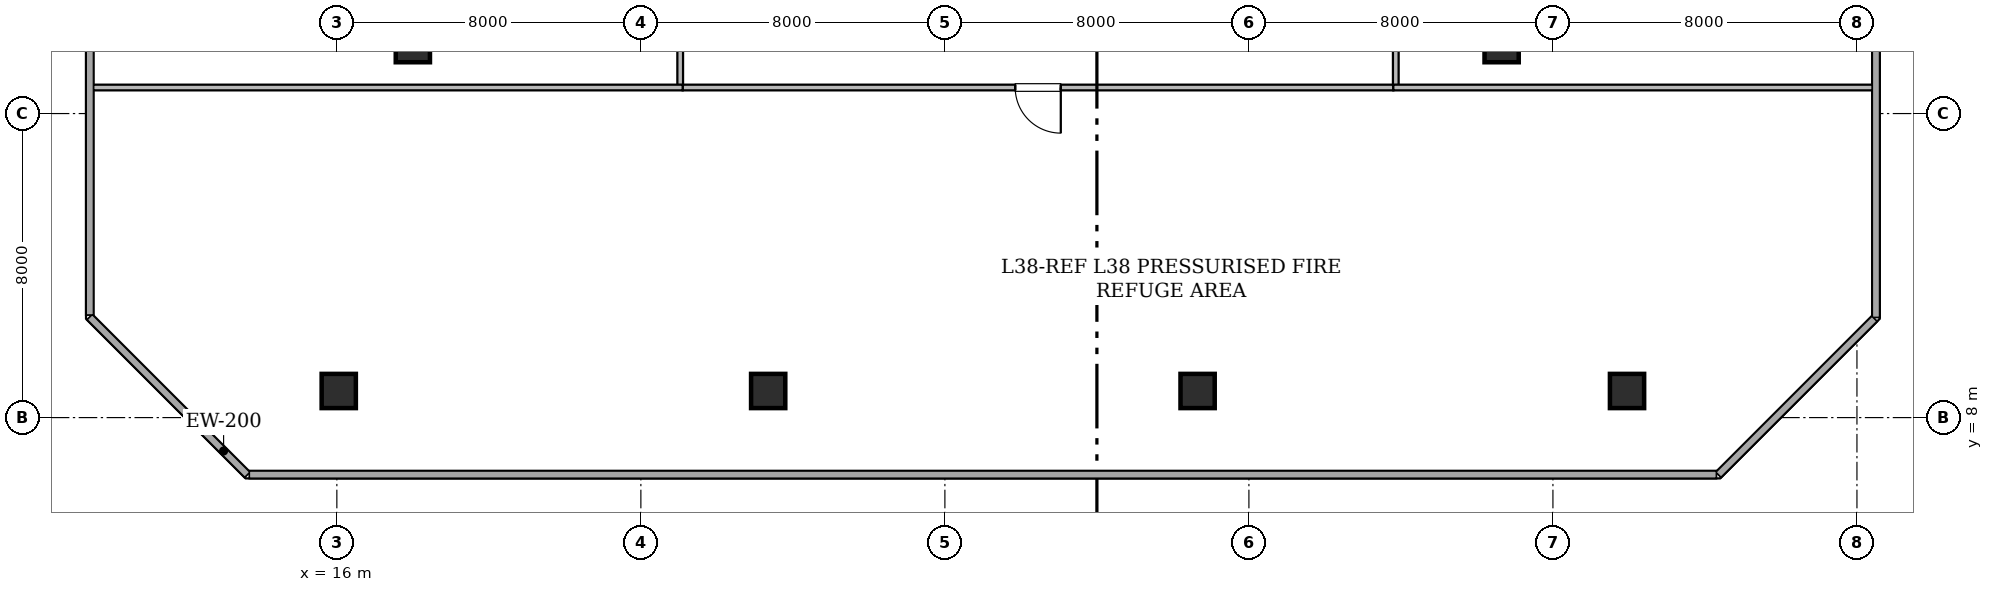
"""IFC4 building model, lengths in metres.
Left out: names, types, materials, properties, quantities, classifications, styles, units other than length and angle.
Written with IfcOpenShell. Run it as: python <this file> out.ifc"""

import sys

from ifc_helpers import new_model, si_unit, direction, frame, frame_2d, origin, origin_2d, place, context, subcontext, project, spatial, rectangle, hollow_rectangle, extrude, element, fill, save


model = new_model("IFC4")
c1 = context("Model", 3, precision=1e-05, world=origin(), true_north=direction((0.0, 1.0)))
c2 = subcontext(c1, "Body", "Model", "MODEL_VIEW")
j1 = project(units=[si_unit("LENGTHUNIT", "METRE"), si_unit("PLANEANGLEUNIT", "RADIAN")], contexts=[c1])
p1 = place(None, origin())
s1 = spatial("IfcSite", under=j1, at=p1, CompositionType="ELEMENT")
p2 = place(p1, origin())
s2 = spatial("IfcBuilding", under=s1, at=p2, CompositionType="ELEMENT")
p3 = place(p2, frame((0.0, 0.0, 150.5)))
s3 = spatial("IfcBuildingStorey", under=s2, at=p3, CompositionType="ELEMENT", Elevation=150.5)
for number, where, z_axis, x_axis in (
    (1, (16.05, 8.7, 0.0), (0.0, 0.0, 1.0), (1.0, 0.0, 0.0)),
    (2, (27.35, 8.7, 0.0), (0.0, 0.0, 1.0), (1.0, 0.0, 0.0)),
    (3, (38.65, 8.7, 0.0), (0.0, 0.0, 1.0), (1.0, 0.0, 0.0)),
    (4, (49.95, 8.7, 0.0), (0.0, 0.0, 1.0), (1.0, 0.0, 0.0)),
    (5, (18.0, 17.8, 0.0), (0.0, 0.0, 1.0), (1.0, 0.0, 0.0)),
    (6, (46.65, 17.8, 0.0), (0.0, 0.0, 1.0), (1.0, 0.0, 0.0)),
):
    element("IfcColumn", number, at=place(p3, frame(where, z_axis=z_axis, x_axis=x_axis)), inside=s3, PredefinedType="COLUMN", context=c2, shape_type="SweptSolid", body=[
        extrude(hollow_rectangle(XDim=0.9, YDim=0.9, WallThickness=0.045, at=origin_2d()), origin(), (0.0, 0.0, 1.0), 5.375),
    ])
p4 = place(p3, frame((13.641, 6.5, 0.0), z_axis=(0.0, 0.0, 1.0), x_axis=(-0.707106781187, 0.707106781187, 0.0)))
e7 = element("IfcWall", 7, at=p4, inside=s3, PredefinedType="STANDARD", context=c2, shape_type="SweptSolid", body=[
    extrude(rectangle(XDim=5.856, YDim=0.2, at=frame_2d((2.928, 0.0))), origin(), (0.0, 0.0, 1.0), 1.15),
])
p5 = place(p3, frame((9.5, 10.704, 0.0), z_axis=(0.0, 0.0, 1.0), x_axis=(0.0, 1.0, 0.0)))
e8 = element("IfcWall", 8, at=p5, inside=s3, PredefinedType="STANDARD", context=c2, shape_type="SweptSolid", body=[
    extrude(rectangle(XDim=14.063, YDim=0.2, at=frame_2d((7.031, 0.0))), origin(), (0.0, 0.0, 1.0), 1.15),
])
p6 = place(p3, frame((56.5, 24.717, 0.0), z_axis=(0.0, 0.0, 1.0), x_axis=(0.0, -1.0, 0.0)))
e9 = element("IfcWall", 9, at=p6, inside=s3, PredefinedType="STANDARD", context=c2, shape_type="SweptSolid", body=[
    extrude(rectangle(XDim=14.076, YDim=0.2, at=frame_2d((7.038, 0.0))), origin(), (0.0, 0.0, 1.0), 1.15),
])
p7 = place(p3, frame((56.457, 10.598, 0.0), z_axis=(0.0, 0.0, 1.0), x_axis=(-0.707127843897, -0.707085717849, 0.0)))
e10 = element("IfcWall", 10, at=p7, inside=s3, PredefinedType="STANDARD", context=c2, shape_type="SweptSolid", body=[
    extrude(rectangle(XDim=5.795, YDim=0.2, at=frame_2d((2.898, 0.0))), origin(), (0.0, 0.0, 1.0), 1.15),
])
p8 = place(p3, frame((52.296, 6.5, 0.0), z_axis=(0.0, 0.0, 1.0), x_axis=(-1.0, 0.0, 0.0)))
e11 = element("IfcWall", 11, at=p8, inside=s3, PredefinedType="STANDARD", context=c2, shape_type="SweptSolid", body=[
    extrude(rectangle(XDim=38.593, YDim=0.2, at=frame_2d((19.296, 0.0))), origin(), (0.0, 0.0, 1.0), 1.15),
])
p9 = place(p3, frame((43.8, 16.685, 0.0), z_axis=(0.0, 0.0, 1.0), x_axis=(-1.0, 0.0, 0.0)))
e12 = element("IfcWall", 12, at=p9, inside=s3, PredefinedType="STANDARD", context=c2, shape_type="SweptSolid", body=[
    extrude(rectangle(XDim=18.7, YDim=0.15, at=frame_2d((9.35, 0.0))), origin(), (0.0, 0.0, 1.0), 3.42),
])
p10 = place(p9, frame((8.75, 0.0, 0.0)))
e13 = element("IfcOpeningElement", 13, at=p10, cuts=e12, PredefinedType="OPENING", context=c2, shape_type="SweptSolid", body=[
    extrude(rectangle(XDim=1.2, YDim=2.15, at=frame_2d((0.6, 1.075))), frame((0.0, 0.085, 0.0), z_axis=(0.0, -1.0, 0.0), x_axis=(1.0, 0.0, 0.0)), (0.0, 0.0, 1.0), 0.17),
])
p11 = place(p3, frame((25.035, 16.75, 0.0), z_axis=(0.0, 0.0, 1.0), x_axis=(0.0, 1.0, 0.0)))
e14 = element("IfcWall", 14, at=p11, inside=s3, PredefinedType="STANDARD", context=c2, shape_type="SweptSolid", body=[
    extrude(rectangle(XDim=12.564, YDim=0.15, at=frame_2d((6.282, 0.0))), origin(), (0.0, 0.0, 1.0), 3.42),
])
p12 = place(p11, frame((5.661, 0.0, 0.0)))
e15 = element("IfcOpeningElement", 15, at=p12, cuts=e14, PredefinedType="OPENING", context=c2, shape_type="SweptSolid", body=[
    extrude(rectangle(XDim=1.2, YDim=2.15, at=frame_2d((0.6, 1.075))), frame((0.0, 0.085, 0.0), z_axis=(0.0, -1.0, 0.0), x_axis=(1.0, 0.0, 0.0)), (0.0, 0.0, 1.0), 0.17),
])
p13 = place(p3, frame((43.865, 29.314, 0.0), z_axis=(0.0, 0.0, 1.0), x_axis=(0.0, -1.0, 0.0)))
e16 = element("IfcWall", 16, at=p13, inside=s3, PredefinedType="STANDARD", context=c2, shape_type="SweptSolid", body=[
    extrude(rectangle(XDim=12.564, YDim=0.15, at=frame_2d((6.282, 0.0))), origin(), (0.0, 0.0, 1.0), 3.42),
])
p14 = place(p13, frame((5.703, 0.0, 0.0)))
e17 = element("IfcOpeningElement", 17, at=p14, cuts=e16, PredefinedType="OPENING", context=c2, shape_type="SweptSolid", body=[
    extrude(rectangle(XDim=1.2, YDim=2.15, at=frame_2d((0.6, 1.075))), frame((0.0, 0.085, 0.0), z_axis=(0.0, -1.0, 0.0), x_axis=(1.0, 0.0, 0.0)), (0.0, 0.0, 1.0), 0.17),
])
p15 = place(p3, frame((9.592, 16.685, 0.0), z_axis=(0.0, 0.0, 1.0), x_axis=(1.0, 0.0, 0.0)))
e18 = element("IfcWall", 18, at=p15, inside=s3, PredefinedType="STANDARD", context=c2, shape_type="SweptSolid", body=[
    extrude(rectangle(XDim=15.508, YDim=0.15, at=frame_2d((7.754, 0.0))), origin(), (0.0, 0.0, 1.0), 3.42),
])
p16 = place(p3, frame((43.8, 16.685, 0.0), z_axis=(0.0, 0.0, 1.0), x_axis=(1.0, 0.0, 0.0)))
e19 = element("IfcWall", 19, at=p16, inside=s3, PredefinedType="STANDARD", context=c2, shape_type="SweptSolid", body=[
    extrude(rectangle(XDim=12.608, YDim=0.15, at=frame_2d((6.304, 0.0))), origin(), (0.0, 0.0, 1.0), 3.42),
])
p17 = place(p10, origin())
e20 = element("IfcDoor", 20, at=p17, inside=s3, OperationType="SINGLE_SWING_LEFT", PredefinedType="DOOR", context=c2, shape_type="SweptSolid", body=[
    extrude(rectangle(XDim=1.2, YDim=2.15, at=frame_2d((0.6, 1.075))), frame((0.0, 0.025, 0.0), z_axis=(0.0, -1.0, 0.0), x_axis=(1.0, 0.0, 0.0)), (0.0, 0.0, 1.0), 0.05),
])
fill(e13, e20)
save(model, sys.argv[1])
